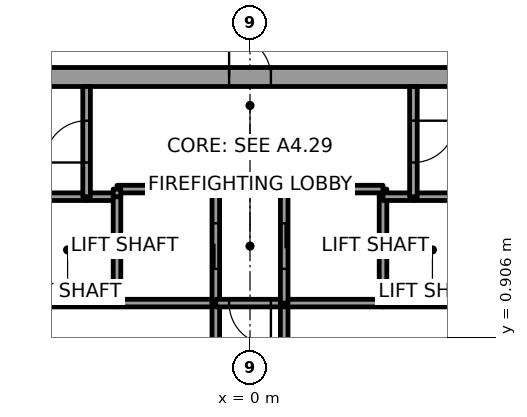
"""IFC4 building model, lengths in metres.
Left out: names, types, materials, properties, quantities, classifications, styles, units other than length and angle.
Written with IfcOpenShell. Run it as: python <this file> out.ifc"""

import sys

from ifc_helpers import new_model, si_unit, direction, frame, frame_2d, origin, place, context, subcontext, project, spatial, rectangle, extrude, element, fill, save


model = new_model("IFC4")
c1 = context("Model", 3, precision=1e-05, world=origin(), true_north=direction((0.0, 1.0)))
c2 = subcontext(c1, "Body", "Model", "MODEL_VIEW")
j1 = project(units=[si_unit("LENGTHUNIT", "METRE"), si_unit("PLANEANGLEUNIT", "RADIAN")], contexts=[c1])
p1 = place(None, origin())
s1 = spatial("IfcSite", under=j1, at=p1, CompositionType="ELEMENT")
p2 = place(p1, origin())
s2 = spatial("IfcBuilding", under=s1, at=p2, CompositionType="ELEMENT")
p3 = place(p2, frame((0.0, 0.0, 129.8)))
s3 = spatial("IfcBuildingStorey", under=s2, at=p3, CompositionType="ELEMENT", Elevation=129.8)
p4 = place(p3, frame((-11.0, 7.75, 0.0), z_axis=(0.0, 0.0, 1.0), x_axis=(1.0, 0.0, 0.0)))
e1 = element("IfcWall", 1, at=p4, inside=s3, PredefinedType="SHEAR", context=c2, shape_type="SweptSolid", body=[
    extrude(rectangle(XDim=22.0, YDim=0.5, at=frame_2d((11.0, 0.0))), origin(), (0.0, 0.0, 1.0), 4.0),
])
p5 = place(p4, frame((10.45, 0.0, 0.0)))
e2 = element("IfcOpeningElement", 2, at=p5, cuts=e1, PredefinedType="OPENING", context=c2, shape_type="SweptSolid", body=[
    extrude(rectangle(XDim=1.1, YDim=2.1, at=frame_2d((0.55, 1.05))), frame((0.0, 0.25, 0.0), z_axis=(0.0, -1.0, 0.0), x_axis=(1.0, 0.0, 0.0)), (0.0, 0.0, 1.0), 0.5),
])
p6 = place(p3, frame((-3.5, 1.8, 0.0), z_axis=(0.0, 0.0, 1.0), x_axis=(-1.0, 0.0, 0.0)))
e3 = element("IfcWall", 3, at=p6, inside=s3, PredefinedType="SOLIDWALL", context=c2, shape_type="SweptSolid", body=[
    extrude(rectangle(XDim=2.6, YDim=0.2, at=frame_2d((1.3, 0.0))), origin(), (0.0, 0.0, 1.0), 3.85),
])
p7 = place(p3, frame((-4.3, 4.6, 0.0), z_axis=(0.0, 0.0, 1.0), x_axis=(-1.0, 0.0, 0.0)))
e4 = element("IfcWall", 4, at=p7, inside=s3, PredefinedType="SOLIDWALL", context=c2, shape_type="SweptSolid", body=[
    extrude(rectangle(XDim=1.8, YDim=0.2, at=frame_2d((0.9, 0.0))), origin(), (0.0, 0.0, 1.0), 3.85),
])
p8 = place(p3, frame((-3.5, 4.6, 0.0), z_axis=(0.0, 0.0, 1.0), x_axis=(-1.0, 0.0, 0.0)))
e5 = element("IfcWall", 5, at=p8, inside=s3, PredefinedType="SOLIDWALL", context=c2, shape_type="SweptSolid", body=[
    extrude(rectangle(XDim=0.8, YDim=0.2, at=frame_2d((0.4, 0.0))), origin(), (0.0, 0.0, 1.0), 3.85),
])
p9 = place(p3, frame((-4.3, 4.6, 0.0), z_axis=(0.0, 0.0, 1.0), x_axis=(0.0, 1.0, 0.0)))
e6 = element("IfcWall", 6, at=p9, inside=s3, PredefinedType="SOLIDWALL", context=c2, shape_type="SweptSolid", body=[
    extrude(rectangle(XDim=2.9, YDim=0.2, at=frame_2d((1.45, 0.0))), origin(), (0.0, 0.0, 1.0), 3.85),
])
p10 = place(p9, frame((0.9, 0.0, 0.0)))
e7 = element("IfcOpeningElement", 7, at=p10, cuts=e6, PredefinedType="OPENING", context=c2, shape_type="SweptSolid", body=[
    extrude(rectangle(XDim=1.1, YDim=2.1, at=frame_2d((0.55, 1.05))), frame((0.0, 0.1, 0.0), z_axis=(0.0, -1.0, 0.0), x_axis=(1.0, 0.0, 0.0)), (0.0, 0.0, 1.0), 0.2),
])
p11 = place(p3, frame((-0.9, 1.8, 0.0), z_axis=(0.0, 0.0, 1.0), x_axis=(-1.0, 0.0, 0.0)))
e8 = element("IfcWall", 8, at=p11, inside=s3, PredefinedType="SOLIDWALL", context=c2, shape_type="SweptSolid", body=[
    extrude(rectangle(XDim=2.6, YDim=0.2, at=frame_2d((1.3, 0.0))), origin(), (0.0, 0.0, 1.0), 3.85),
])
p12 = place(p3, frame((-3.5, 4.6, 0.0), z_axis=(0.0, 0.0, 1.0), x_axis=(0.0, -1.0, 0.0)))
e9 = element("IfcWall", 9, at=p12, inside=s3, PredefinedType="SOLIDWALL", context=c2, shape_type="SweptSolid", body=[
    extrude(rectangle(XDim=2.8, YDim=0.2, at=frame_2d((1.4, 0.0))), origin(), (0.0, 0.0, 1.0), 3.85),
])
p13 = place(p3, frame((-0.9, 1.8, 0.0), z_axis=(0.0, 0.0, 1.0), x_axis=(0.0, 1.0, 0.0)))
e10 = element("IfcWall", 10, at=p13, inside=s3, PredefinedType="SOLIDWALL", context=c2, shape_type="SweptSolid", body=[
    extrude(rectangle(XDim=3.0, YDim=0.2, at=frame_2d((1.5, 0.0))), origin(), (0.0, 0.0, 1.0), 3.85),
])
p14 = place(p13, frame((0.9, 0.0, 0.0)))
e11 = element("IfcOpeningElement", 11, at=p14, cuts=e10, PredefinedType="OPENING", context=c2, shape_type="SweptSolid", body=[
    extrude(rectangle(XDim=1.2, YDim=2.1, at=frame_2d((0.6, 1.05))), frame((0.0, 0.1, 0.0), z_axis=(0.0, -1.0, 0.0), x_axis=(1.0, 0.0, 0.0)), (0.0, 0.0, 1.0), 0.2),
])
p15 = place(p3, frame((-0.9, 4.8, 0.0), z_axis=(0.0, 0.0, 1.0), x_axis=(-1.0, 0.0, 0.0)))
e12 = element("IfcWall", 12, at=p15, inside=s3, PredefinedType="SOLIDWALL", context=c2, shape_type="SweptSolid", body=[
    extrude(rectangle(XDim=2.6, YDim=0.2, at=frame_2d((1.3, 0.0))), origin(), (0.0, 0.0, 1.0), 3.85),
])
p16 = place(p3, frame((-3.5, 4.8, 0.0), z_axis=(0.0, 0.0, 1.0), x_axis=(0.0, -1.0, 0.0)))
e13 = element("IfcWall", 13, at=p16, inside=s3, PredefinedType="SOLIDWALL", context=c2, shape_type="SweptSolid", body=[
    extrude(rectangle(XDim=0.2, YDim=0.2, at=frame_2d((0.1, 0.0))), origin(), (0.0, 0.0, 1.0), 3.85),
])
p17 = place(p3, frame((-0.9, 1.8, 0.0), z_axis=(0.0, 0.0, 1.0), x_axis=(0.0, -1.0, 0.0)))
e14 = element("IfcWall", 14, at=p17, inside=s3, PredefinedType="SOLIDWALL", context=c2, shape_type="SweptSolid", body=[
    extrude(rectangle(XDim=3.6, YDim=0.2, at=frame_2d((1.8, 0.0))), origin(), (0.0, 0.0, 1.0), 3.85),
])
p18 = place(p17, frame((1.05, 0.0, 0.0)))
e15 = element("IfcOpeningElement", 15, at=p18, cuts=e14, PredefinedType="OPENING", context=c2, shape_type="SweptSolid", body=[
    extrude(rectangle(XDim=1.5, YDim=2.1, at=frame_2d((0.75, 1.05))), frame((0.0, 0.1, 0.0), z_axis=(0.0, -1.0, 0.0), x_axis=(1.0, 0.0, 0.0)), (0.0, 0.0, 1.0), 0.2),
])
p19 = place(p3, frame((0.9, 1.8, 0.0), z_axis=(0.0, 0.0, 1.0), x_axis=(-1.0, 0.0, 0.0)))
e16 = element("IfcWall", 16, at=p19, inside=s3, PredefinedType="SOLIDWALL", context=c2, shape_type="SweptSolid", body=[
    extrude(rectangle(XDim=1.8, YDim=0.2, at=frame_2d((0.9, 0.0))), origin(), (0.0, 0.0, 1.0), 3.85),
])
p20 = place(p19, frame((0.35, 0.0, 0.0)))
e17 = element("IfcOpeningElement", 17, at=p20, cuts=e16, PredefinedType="OPENING", context=c2, shape_type="SweptSolid", body=[
    extrude(rectangle(XDim=1.1, YDim=2.1, at=frame_2d((0.55, 1.05))), frame((0.0, 0.1, 0.0), z_axis=(0.0, -1.0, 0.0), x_axis=(1.0, 0.0, 0.0)), (0.0, 0.0, 1.0), 0.2),
])
p21 = place(p3, frame((0.9, -1.8, 0.0), z_axis=(0.0, 0.0, 1.0), x_axis=(0.0, 1.0, 0.0)))
e18 = element("IfcWall", 18, at=p21, inside=s3, PredefinedType="SOLIDWALL", context=c2, shape_type="SweptSolid", body=[
    extrude(rectangle(XDim=3.6, YDim=0.2, at=frame_2d((1.8, 0.0))), origin(), (0.0, 0.0, 1.0), 3.85),
])
p22 = place(p21, frame((1.05, 0.0, 0.0)))
e19 = element("IfcOpeningElement", 19, at=p22, cuts=e18, PredefinedType="OPENING", context=c2, shape_type="SweptSolid", body=[
    extrude(rectangle(XDim=1.5, YDim=2.1, at=frame_2d((0.75, 1.05))), frame((0.0, 0.1, 0.0), z_axis=(0.0, -1.0, 0.0), x_axis=(1.0, 0.0, 0.0)), (0.0, 0.0, 1.0), 0.2),
])
p23 = place(p3, frame((3.5, 1.8, 0.0), z_axis=(0.0, 0.0, 1.0), x_axis=(-1.0, 0.0, 0.0)))
e20 = element("IfcWall", 20, at=p23, inside=s3, PredefinedType="SOLIDWALL", context=c2, shape_type="SweptSolid", body=[
    extrude(rectangle(XDim=2.6, YDim=0.2, at=frame_2d((1.3, 0.0))), origin(), (0.0, 0.0, 1.0), 3.85),
])
p24 = place(p3, frame((3.5, 4.6, 0.0), z_axis=(0.0, 0.0, 1.0), x_axis=(0.0, 1.0, 0.0)))
e21 = element("IfcWall", 21, at=p24, inside=s3, PredefinedType="SOLIDWALL", context=c2, shape_type="SweptSolid", body=[
    extrude(rectangle(XDim=0.2, YDim=0.2, at=frame_2d((0.1, 0.0))), origin(), (0.0, 0.0, 1.0), 3.85),
])
p25 = place(p3, frame((3.5, 4.8, 0.0), z_axis=(0.0, 0.0, 1.0), x_axis=(-1.0, 0.0, 0.0)))
e22 = element("IfcWall", 22, at=p25, inside=s3, PredefinedType="SOLIDWALL", context=c2, shape_type="SweptSolid", body=[
    extrude(rectangle(XDim=2.6, YDim=0.2, at=frame_2d((1.3, 0.0))), origin(), (0.0, 0.0, 1.0), 3.85),
])
p26 = place(p3, frame((0.9, 4.8, 0.0), z_axis=(0.0, 0.0, 1.0), x_axis=(0.0, -1.0, 0.0)))
e23 = element("IfcWall", 23, at=p26, inside=s3, PredefinedType="SOLIDWALL", context=c2, shape_type="SweptSolid", body=[
    extrude(rectangle(XDim=3.0, YDim=0.2, at=frame_2d((1.5, 0.0))), origin(), (0.0, 0.0, 1.0), 3.85),
])
p27 = place(p26, frame((0.9, 0.0, 0.0)))
e24 = element("IfcOpeningElement", 24, at=p27, cuts=e23, PredefinedType="OPENING", context=c2, shape_type="SweptSolid", body=[
    extrude(rectangle(XDim=1.2, YDim=2.1, at=frame_2d((0.6, 1.05))), frame((0.0, 0.1, 0.0), z_axis=(0.0, -1.0, 0.0), x_axis=(1.0, 0.0, 0.0)), (0.0, 0.0, 1.0), 0.2),
])
p28 = place(p3, frame((6.1, 1.8, 0.0), z_axis=(0.0, 0.0, 1.0), x_axis=(-1.0, 0.0, 0.0)))
e25 = element("IfcWall", 25, at=p28, inside=s3, PredefinedType="SOLIDWALL", context=c2, shape_type="SweptSolid", body=[
    extrude(rectangle(XDim=2.6, YDim=0.2, at=frame_2d((1.3, 0.0))), origin(), (0.0, 0.0, 1.0), 3.85),
])
p29 = place(p3, frame((3.5, 1.8, 0.0), z_axis=(0.0, 0.0, 1.0), x_axis=(0.0, 1.0, 0.0)))
e26 = element("IfcWall", 26, at=p29, inside=s3, PredefinedType="SOLIDWALL", context=c2, shape_type="SweptSolid", body=[
    extrude(rectangle(XDim=2.8, YDim=0.2, at=frame_2d((1.4, 0.0))), origin(), (0.0, 0.0, 1.0), 3.85),
])
p30 = place(p3, frame((4.3, 4.6, 0.0), z_axis=(0.0, 0.0, 1.0), x_axis=(-1.0, 0.0, 0.0)))
e27 = element("IfcWall", 27, at=p30, inside=s3, PredefinedType="SOLIDWALL", context=c2, shape_type="SweptSolid", body=[
    extrude(rectangle(XDim=0.8, YDim=0.2, at=frame_2d((0.4, 0.0))), origin(), (0.0, 0.0, 1.0), 3.85),
])
p31 = place(p3, frame((6.1, 4.6, 0.0), z_axis=(0.0, 0.0, 1.0), x_axis=(-1.0, 0.0, 0.0)))
e28 = element("IfcWall", 28, at=p31, inside=s3, PredefinedType="SOLIDWALL", context=c2, shape_type="SweptSolid", body=[
    extrude(rectangle(XDim=1.8, YDim=0.2, at=frame_2d((0.9, 0.0))), origin(), (0.0, 0.0, 1.0), 3.85),
])
p32 = place(p3, frame((4.3, 7.5, 0.0), z_axis=(0.0, 0.0, 1.0), x_axis=(0.0, -1.0, 0.0)))
e29 = element("IfcWall", 29, at=p32, inside=s3, PredefinedType="SOLIDWALL", context=c2, shape_type="SweptSolid", body=[
    extrude(rectangle(XDim=2.9, YDim=0.2, at=frame_2d((1.45, 0.0))), origin(), (0.0, 0.0, 1.0), 3.85),
])
p33 = place(p32, frame((0.9, 0.0, 0.0)))
e30 = element("IfcOpeningElement", 30, at=p33, cuts=e29, PredefinedType="OPENING", context=c2, shape_type="SweptSolid", body=[
    extrude(rectangle(XDim=1.1, YDim=2.1, at=frame_2d((0.55, 1.05))), frame((0.0, 0.1, 0.0), z_axis=(0.0, -1.0, 0.0), x_axis=(1.0, 0.0, 0.0)), (0.0, 0.0, 1.0), 0.2),
])
p34 = place(p14, origin())
e31 = element("IfcDoor", 31, at=p34, inside=s3, OperationType="SLIDING_TO_LEFT", PredefinedType="DOOR", context=c2, shape_type="SweptSolid", body=[
    extrude(rectangle(XDim=1.2, YDim=2.1, at=frame_2d((0.6, 1.05))), frame((0.0, 0.025, 0.0), z_axis=(0.0, -1.0, 0.0), x_axis=(1.0, 0.0, 0.0)), (0.0, 0.0, 1.0), 0.05),
])
fill(e11, e31)
p35 = place(p27, origin())
e32 = element("IfcDoor", 32, at=p35, inside=s3, OperationType="SLIDING_TO_LEFT", PredefinedType="DOOR", context=c2, shape_type="SweptSolid", body=[
    extrude(rectangle(XDim=1.2, YDim=2.1, at=frame_2d((0.6, 1.05))), frame((0.0, 0.025, 0.0), z_axis=(0.0, -1.0, 0.0), x_axis=(1.0, 0.0, 0.0)), (0.0, 0.0, 1.0), 0.05),
])
fill(e24, e32)
p36 = place(p20, origin())
e33 = element("IfcDoor", 33, at=p36, inside=s3, OperationType="SINGLE_SWING_LEFT", PredefinedType="DOOR", context=c2, shape_type="SweptSolid", body=[
    extrude(rectangle(XDim=1.1, YDim=2.1, at=frame_2d((0.55, 1.05))), frame((0.0, 0.025, 0.0), z_axis=(0.0, -1.0, 0.0), x_axis=(1.0, 0.0, 0.0)), (0.0, 0.0, 1.0), 0.05),
])
fill(e17, e33)
p37 = place(p10, origin())
e34 = element("IfcDoor", 34, at=p37, inside=s3, OperationType="SINGLE_SWING_LEFT", PredefinedType="DOOR", context=c2, shape_type="SweptSolid", body=[
    extrude(rectangle(XDim=1.1, YDim=2.1, at=frame_2d((0.55, 1.05))), frame((0.0, 0.025, 0.0), z_axis=(0.0, -1.0, 0.0), x_axis=(1.0, 0.0, 0.0)), (0.0, 0.0, 1.0), 0.05),
])
fill(e7, e34)
p38 = place(p33, origin())
e35 = element("IfcDoor", 35, at=p38, inside=s3, OperationType="SINGLE_SWING_RIGHT", PredefinedType="DOOR", context=c2, shape_type="SweptSolid", body=[
    extrude(rectangle(XDim=1.1, YDim=2.1, at=frame_2d((0.55, 1.05))), frame((0.0, 0.025, 0.0), z_axis=(0.0, -1.0, 0.0), x_axis=(1.0, 0.0, 0.0)), (0.0, 0.0, 1.0), 0.05),
])
fill(e30, e35)
p39 = place(p5, origin())
e36 = element("IfcDoor", 36, at=p39, inside=s3, OperationType="SINGLE_SWING_RIGHT", PredefinedType="DOOR", context=c2, shape_type="SweptSolid", body=[
    extrude(rectangle(XDim=1.1, YDim=2.1, at=frame_2d((0.55, 1.05))), frame((0.0, 0.025, 0.0), z_axis=(0.0, -1.0, 0.0), x_axis=(1.0, 0.0, 0.0)), (0.0, 0.0, 1.0), 0.05),
])
fill(e2, e36)
save(model, sys.argv[1])
